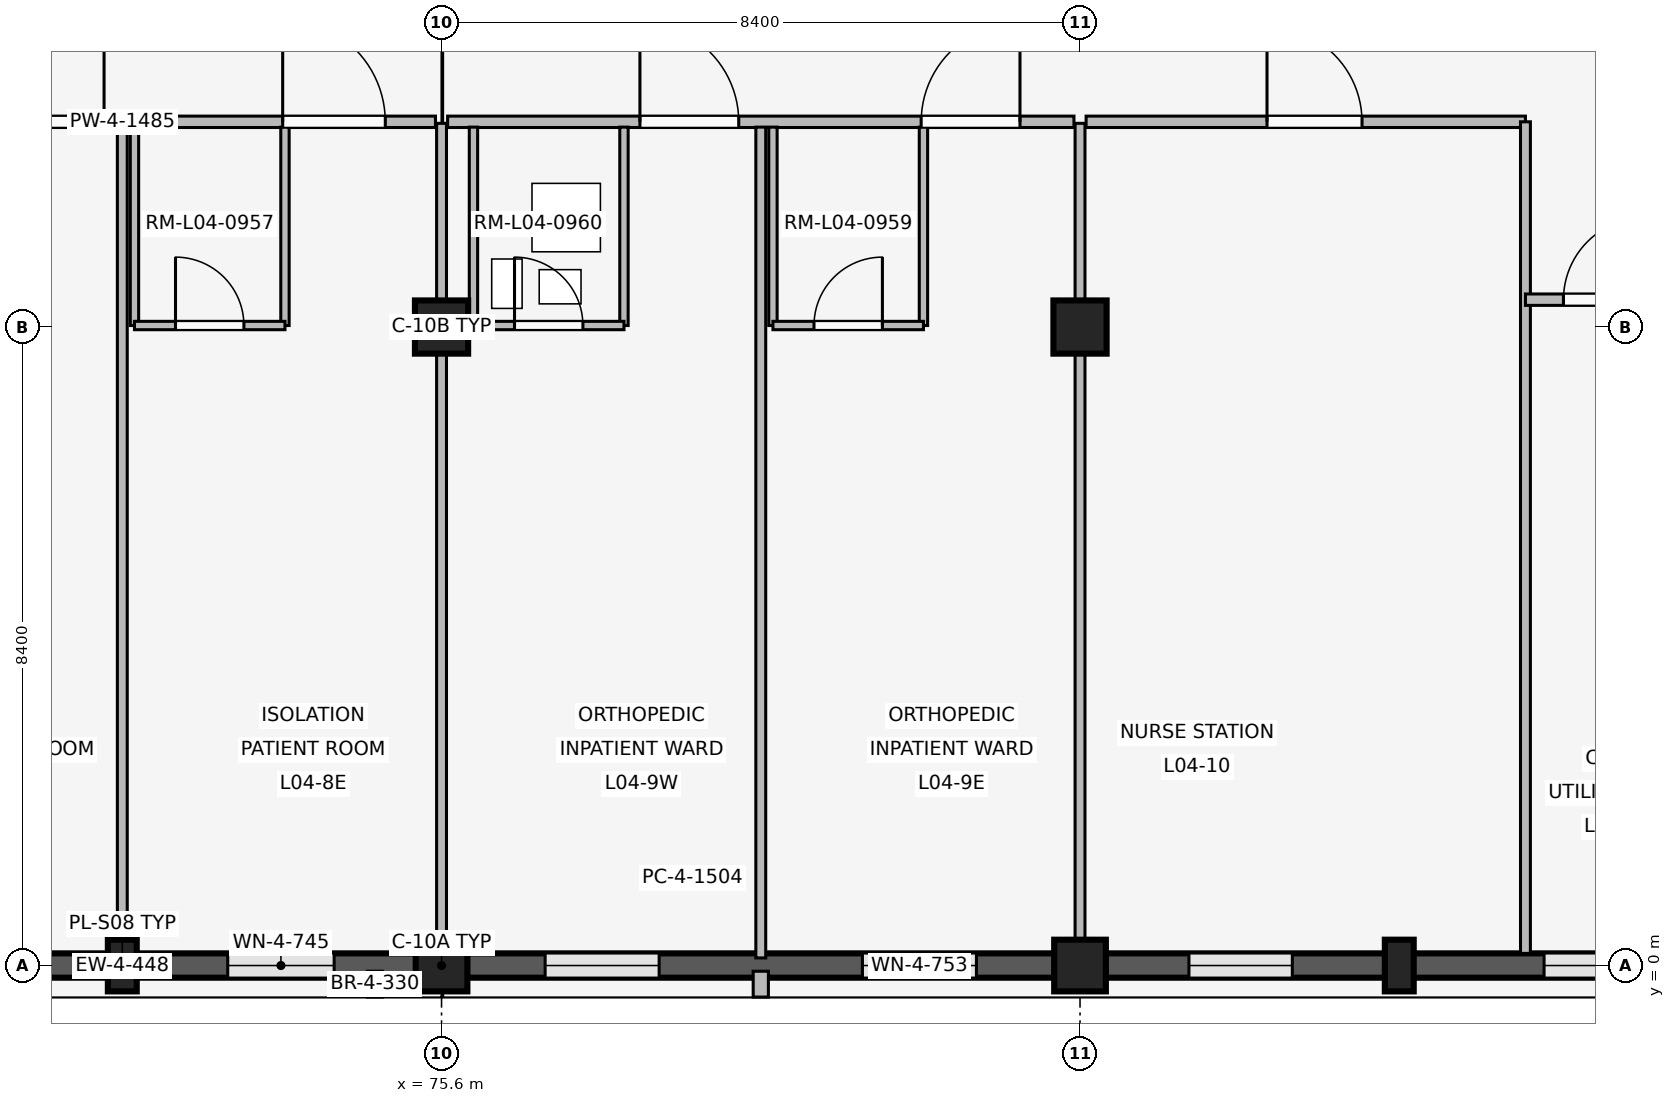
"""IFC4 building model, lengths in metres.
Left out: names, types, materials, properties, quantities, classifications, styles, units other than length and angle.
Written with IfcOpenShell. Run it as: python <this file> out.ifc"""

import sys

from ifc_helpers import new_model, si_unit, direction, frame, frame_2d, origin, origin_2d, place, context, subcontext, project, spatial, rectangle, extrude, element, fill, save


model = new_model("IFC4")
c1 = context("Model", 3, precision=1e-05, world=origin(), true_north=direction((0.0, 1.0)))
c2 = subcontext(c1, "Body", "Model", "MODEL_VIEW")
j1 = project(units=[si_unit("LENGTHUNIT", "METRE"), si_unit("PLANEANGLEUNIT", "RADIAN")], contexts=[c1])
p1 = place(None, origin())
s1 = spatial("IfcSite", under=j1, at=p1, CompositionType="ELEMENT")
p2 = place(p1, origin())
s2 = spatial("IfcBuilding", under=s1, at=p2, CompositionType="ELEMENT")
p3 = place(p2, frame((0.0, 0.0, 16.2)))
s3 = spatial("IfcBuildingStorey", under=s2, at=p3, CompositionType="ELEMENT", Elevation=16.2)
p4 = place(p3, frame((75.6, 0.0, 0.0), z_axis=(0.0, 0.0, 1.0), x_axis=(1.0, 0.0, 0.0)))
e1 = element("IfcColumn", 1, at=p4, inside=s3, PredefinedType="COLUMN", context=c2, shape_type="SweptSolid", body=[
    extrude(rectangle(XDim=0.68, YDim=0.68, at=origin_2d()), origin(), (0.0, 0.0, 1.0), 4.2),
])
p5 = place(p3, frame((75.6, 8.4, 0.0), z_axis=(0.0, 0.0, 1.0), x_axis=(1.0, 0.0, 0.0)))
e2 = element("IfcColumn", 2, at=p5, inside=s3, PredefinedType="COLUMN", context=c2, shape_type="SweptSolid", body=[
    extrude(rectangle(XDim=0.7, YDim=0.7, at=origin_2d()), origin(), (0.0, 0.0, 1.0), 4.2),
])
p6 = place(p3, frame((84.0, 0.0, 0.0), z_axis=(0.0, 0.0, 1.0), x_axis=(1.0, 0.0, 0.0)))
e3 = element("IfcColumn", 3, at=p6, inside=s3, PredefinedType="COLUMN", context=c2, shape_type="SweptSolid", body=[
    extrude(rectangle(XDim=0.68, YDim=0.68, at=origin_2d()), origin(), (0.0, 0.0, 1.0), 4.2),
])
p7 = place(p3, frame((84.0, 8.4, 0.0), z_axis=(0.0, 0.0, 1.0), x_axis=(1.0, 0.0, 0.0)))
e4 = element("IfcColumn", 4, at=p7, inside=s3, PredefinedType="COLUMN", context=c2, shape_type="SweptSolid", body=[
    extrude(rectangle(XDim=0.7, YDim=0.7, at=origin_2d()), origin(), (0.0, 0.0, 1.0), 4.2),
])
for number, where, z_axis, x_axis in (
    (5, (71.4, 0.0, 0.0), (0.0, 0.0, 1.0), (1.0, 0.0, 0.0)),
    (6, (88.2, 0.0, 0.0), (0.0, 0.0, 1.0), (1.0, 0.0, 0.0)),
):
    element("IfcColumn", number, at=place(p3, frame(where, z_axis=z_axis, x_axis=x_axis)), inside=s3, PredefinedType="PILASTER", context=c2, shape_type="SweptSolid", body=[
        extrude(rectangle(XDim=0.38, YDim=0.68, at=origin_2d()), origin(), (0.0, 0.0, 1.0), 4.2),
    ])
p8 = place(p3, frame((75.265, 0.0, 0.0), z_axis=(0.0, 0.0, 1.0), x_axis=(-1.0, 0.0, 0.0)))
e7 = element("IfcWall", 7, at=p8, inside=s3, PredefinedType="SOLIDWALL", context=c2, shape_type="SweptSolid", body=[
    extrude(rectangle(XDim=7.73, YDim=0.32, at=frame_2d((3.865, 0.0))), origin(), (0.0, 0.0, 1.0), 3.32),
])
p9 = place(p8, frame((1.078, 0.0, 0.85)))
e8 = element("IfcOpeningElement", 8, at=p9, cuts=e7, PredefinedType="OPENING", context=c2, shape_type="SweptSolid", body=[
    extrude(rectangle(XDim=1.4, YDim=1.4, at=frame_2d((0.7, 0.7))), frame((0.0, 0.17, 0.0), z_axis=(0.0, -1.0, 0.0), x_axis=(1.0, 0.0, 0.0)), (0.0, 0.0, 1.0), 0.34),
])
p10 = place(p8, frame((5.252, 0.0, 0.85)))
e9 = element("IfcOpeningElement", 9, at=p10, cuts=e7, PredefinedType="OPENING", context=c2, shape_type="SweptSolid", body=[
    extrude(rectangle(XDim=1.4, YDim=1.4, at=frame_2d((0.7, 0.7))), frame((0.0, 0.17, 0.0), z_axis=(0.0, -1.0, 0.0), x_axis=(1.0, 0.0, 0.0)), (0.0, 0.0, 1.0), 0.34),
])
p11 = place(p3, frame((74.724, -0.075, 0.0), z_axis=(0.0, 0.0, 1.0), x_axis=(0.0, -1.0, 0.0)))
e10 = element("IfcWall", 10, at=p11, inside=s3, PredefinedType="ELEMENTEDWALL", context=c2, shape_type="SweptSolid", body=[
    extrude(rectangle(XDim=0.34, YDim=0.2, at=frame_2d((0.17, 0.0))), origin(), (0.0, 0.0, 1.0), 3.3),
])
p12 = place(p3, frame((83.665, 0.0, 0.0), z_axis=(0.0, 0.0, 1.0), x_axis=(-1.0, 0.0, 0.0)))
e11 = element("IfcWall", 11, at=p12, inside=s3, PredefinedType="SOLIDWALL", context=c2, shape_type="SweptSolid", body=[
    extrude(rectangle(XDim=7.73, YDim=0.32, at=frame_2d((3.865, 0.0))), origin(), (0.0, 0.0, 1.0), 3.32),
])
p13 = place(p12, frame((1.028, 0.0, 0.85)))
e12 = element("IfcOpeningElement", 12, at=p13, cuts=e11, PredefinedType="OPENING", context=c2, shape_type="SweptSolid", body=[
    extrude(rectangle(XDim=1.5, YDim=1.55, at=frame_2d((0.75, 0.775))), frame((0.0, 0.17, 0.0), z_axis=(0.0, -1.0, 0.0), x_axis=(1.0, 0.0, 0.0)), (0.0, 0.0, 1.0), 0.34),
])
p14 = place(p12, frame((5.202, 0.0, 0.85)))
e13 = element("IfcOpeningElement", 13, at=p14, cuts=e11, PredefinedType="OPENING", context=c2, shape_type="SweptSolid", body=[
    extrude(rectangle(XDim=1.5, YDim=1.55, at=frame_2d((0.75, 0.775))), frame((0.0, 0.17, 0.0), z_axis=(0.0, -1.0, 0.0), x_axis=(1.0, 0.0, 0.0)), (0.0, 0.0, 1.0), 0.34),
])
p15 = place(p3, frame((79.8, -0.075, 0.0), z_axis=(0.0, 0.0, 1.0), x_axis=(0.0, -1.0, 0.0)))
e14 = element("IfcWall", 14, at=p15, inside=s3, PredefinedType="ELEMENTEDWALL", context=c2, shape_type="SweptSolid", body=[
    extrude(rectangle(XDim=0.34, YDim=0.2, at=frame_2d((0.17, 0.0))), origin(), (0.0, 0.0, 1.0), 3.3),
])
p16 = place(p3, frame((92.065, 0.0, 0.0), z_axis=(0.0, 0.0, 1.0), x_axis=(-1.0, 0.0, 0.0)))
e15 = element("IfcWall", 15, at=p16, inside=s3, PredefinedType="SOLIDWALL", context=c2, shape_type="SweptSolid", body=[
    extrude(rectangle(XDim=7.73, YDim=0.32, at=frame_2d((3.865, 0.0))), origin(), (0.0, 0.0, 1.0), 3.32),
])
p17 = place(p16, frame((0.6, 0.0, 0.85)))
e16 = element("IfcOpeningElement", 16, at=p17, cuts=e15, PredefinedType="OPENING", context=c2, shape_type="SweptSolid", body=[
    extrude(rectangle(XDim=1.36, YDim=1.42, at=frame_2d((0.68, 0.71))), frame((0.0, 0.17, 0.0), z_axis=(0.0, -1.0, 0.0), x_axis=(1.0, 0.0, 0.0)), (0.0, 0.0, 1.0), 0.34),
])
p18 = place(p16, frame((5.272, 0.0, 0.85)))
e17 = element("IfcOpeningElement", 17, at=p18, cuts=e15, PredefinedType="OPENING", context=c2, shape_type="SweptSolid", body=[
    extrude(rectangle(XDim=1.36, YDim=1.42, at=frame_2d((0.68, 0.71))), frame((0.0, 0.17, 0.0), z_axis=(0.0, -1.0, 0.0), x_axis=(1.0, 0.0, 0.0)), (0.0, 0.0, 1.0), 0.34),
])
p19 = place(p3, frame((67.28, 11.1, 0.0), z_axis=(0.0, 0.0, 1.0), x_axis=(1.0, 0.0, 0.0)))
e18 = element("IfcWall", 18, at=p19, inside=s3, PredefinedType="PARTITIONING", context=c2, shape_type="SweptSolid", body=[
    extrude(rectangle(XDim=8.24, YDim=0.15, at=frame_2d((4.12, 0.0))), origin(), (0.0, 0.0, 1.0), 3.3),
])
p20 = place(p19, frame((2.53, 0.0, 0.0)))
e19 = element("IfcOpeningElement", 19, at=p20, cuts=e18, PredefinedType="OPENING", context=c2, shape_type="SweptSolid", body=[
    extrude(rectangle(XDim=1.35, YDim=2.25, at=frame_2d((0.675, 1.125))), frame((0.0, 0.085, 0.0), z_axis=(0.0, -1.0, 0.0), x_axis=(1.0, 0.0, 0.0)), (0.0, 0.0, 1.0), 0.17),
])
p21 = place(p19, frame((6.23, 0.0, 0.0)))
e20 = element("IfcOpeningElement", 20, at=p21, cuts=e18, PredefinedType="OPENING", context=c2, shape_type="SweptSolid", body=[
    extrude(rectangle(XDim=1.35, YDim=2.25, at=frame_2d((0.675, 1.125))), frame((0.0, 0.085, 0.0), z_axis=(0.0, -1.0, 0.0), x_axis=(1.0, 0.0, 0.0)), (0.0, 0.0, 1.0), 0.17),
])
p22 = place(p3, frame((71.4, 0.1, 0.0), z_axis=(0.0, 0.0, 1.0), x_axis=(0.0, 1.0, 0.0)))
e21 = element("IfcWall", 21, at=p22, inside=s3, PredefinedType="PARTITIONING", context=c2, shape_type="SweptSolid", body=[
    extrude(rectangle(XDim=10.93, YDim=0.13, at=frame_2d((5.465, 0.0))), origin(), (0.0, 0.0, 1.0), 3.3),
])
for number, where, z_axis, x_axis in (
    (22, (71.56, 8.42, 0.0), (0.0, 0.0, 1.0), (0.0, 1.0, 0.0)),
    (23, (73.54, 8.42, 0.0), (0.0, 0.0, 1.0), (0.0, 1.0, 0.0)),
):
    element("IfcWall", number, at=place(p3, frame(where, z_axis=z_axis, x_axis=x_axis)), inside=s3, PredefinedType="PARTITIONING", context=c2, shape_type="SweptSolid", body=[
        extrude(rectangle(XDim=2.61, YDim=0.11, at=frame_2d((1.305, 0.0))), origin(), (0.0, 0.0, 1.0), 3.3),
    ])
p23 = place(p3, frame((71.56, 8.42, 0.0), z_axis=(0.0, 0.0, 1.0), x_axis=(1.0, 0.0, 0.0)))
e24 = element("IfcWall", 24, at=p23, inside=s3, PredefinedType="PARTITIONING", context=c2, shape_type="SweptSolid", body=[
    extrude(rectangle(XDim=1.98, YDim=0.11, at=frame_2d((0.99, 0.0))), origin(), (0.0, 0.0, 1.0), 3.3),
])
p24 = place(p23, frame((0.54, 0.0, 0.0)))
e25 = element("IfcOpeningElement", 25, at=p24, cuts=e24, PredefinedType="OPENING", context=c2, shape_type="SweptSolid", body=[
    extrude(rectangle(XDim=0.9, YDim=2.1, at=frame_2d((0.45, 1.05))), frame((0.0, 0.065, 0.0), z_axis=(0.0, -1.0, 0.0), x_axis=(1.0, 0.0, 0.0)), (0.0, 0.0, 1.0), 0.13),
])
p25 = place(p3, frame((75.6, 0.14, 0.0), z_axis=(0.0, 0.0, 1.0), x_axis=(0.0, 1.0, 0.0)))
e26 = element("IfcWall", 26, at=p25, inside=s3, PredefinedType="PARTITIONING", context=c2, shape_type="SweptSolid", body=[
    extrude(rectangle(XDim=10.94, YDim=0.13, at=frame_2d((5.47, 0.0))), origin(), (0.0, 0.0, 1.0), 3.3),
])
p26 = place(p3, frame((75.68, 11.1, 0.0), z_axis=(0.0, 0.0, 1.0), x_axis=(1.0, 0.0, 0.0)))
e27 = element("IfcWall", 27, at=p26, inside=s3, PredefinedType="PARTITIONING", context=c2, shape_type="SweptSolid", body=[
    extrude(rectangle(XDim=8.24, YDim=0.15, at=frame_2d((4.12, 0.0))), origin(), (0.0, 0.0, 1.0), 3.3),
])
p27 = place(p26, frame((2.53, 0.0, 0.0)))
e28 = element("IfcOpeningElement", 28, at=p27, cuts=e27, PredefinedType="OPENING", context=c2, shape_type="SweptSolid", body=[
    extrude(rectangle(XDim=1.3, YDim=2.25, at=frame_2d((0.65, 1.125))), frame((0.0, 0.085, 0.0), z_axis=(0.0, -1.0, 0.0), x_axis=(1.0, 0.0, 0.0)), (0.0, 0.0, 1.0), 0.17),
])
p28 = place(p26, frame((6.23, 0.0, 0.0)))
e29 = element("IfcOpeningElement", 29, at=p28, cuts=e27, PredefinedType="OPENING", context=c2, shape_type="SweptSolid", body=[
    extrude(rectangle(XDim=1.3, YDim=2.25, at=frame_2d((0.65, 1.125))), frame((0.0, 0.085, 0.0), z_axis=(0.0, -1.0, 0.0), x_axis=(1.0, 0.0, 0.0)), (0.0, 0.0, 1.0), 0.17),
])
p29 = place(p3, frame((79.8, 0.1, 0.0), z_axis=(0.0, 0.0, 1.0), x_axis=(0.0, 1.0, 0.0)))
e30 = element("IfcWall", 30, at=p29, inside=s3, PredefinedType="PARTITIONING", context=c2, shape_type="SweptSolid", body=[
    extrude(rectangle(XDim=10.93, YDim=0.13, at=frame_2d((5.465, 0.0))), origin(), (0.0, 0.0, 1.0), 3.3),
])
for number, where, z_axis, x_axis in (
    (31, (76.02, 8.42, 0.0), (0.0, 0.0, 1.0), (0.0, 1.0, 0.0)),
    (32, (78.0, 8.42, 0.0), (0.0, 0.0, 1.0), (0.0, 1.0, 0.0)),
):
    element("IfcWall", number, at=place(p3, frame(where, z_axis=z_axis, x_axis=x_axis)), inside=s3, PredefinedType="PARTITIONING", context=c2, shape_type="SweptSolid", body=[
        extrude(rectangle(XDim=2.61, YDim=0.11, at=frame_2d((1.305, 0.0))), origin(), (0.0, 0.0, 1.0), 3.3),
    ])
p30 = place(p3, frame((76.02, 8.42, 0.0), z_axis=(0.0, 0.0, 1.0), x_axis=(1.0, 0.0, 0.0)))
e33 = element("IfcWall", 33, at=p30, inside=s3, PredefinedType="PARTITIONING", context=c2, shape_type="SweptSolid", body=[
    extrude(rectangle(XDim=1.98, YDim=0.11, at=frame_2d((0.99, 0.0))), origin(), (0.0, 0.0, 1.0), 3.3),
])
p31 = place(p30, frame((0.54, 0.0, 0.0)))
e34 = element("IfcOpeningElement", 34, at=p31, cuts=e33, PredefinedType="OPENING", context=c2, shape_type="SweptSolid", body=[
    extrude(rectangle(XDim=0.9, YDim=2.1, at=frame_2d((0.45, 1.05))), frame((0.0, 0.065, 0.0), z_axis=(0.0, -1.0, 0.0), x_axis=(1.0, 0.0, 0.0)), (0.0, 0.0, 1.0), 0.13),
])
for number, where, z_axis, x_axis in (
    (35, (79.96, 8.42, 0.0), (0.0, 0.0, 1.0), (0.0, 1.0, 0.0)),
    (36, (81.94, 8.42, 0.0), (0.0, 0.0, 1.0), (0.0, 1.0, 0.0)),
):
    element("IfcWall", number, at=place(p3, frame(where, z_axis=z_axis, x_axis=x_axis)), inside=s3, PredefinedType="PARTITIONING", context=c2, shape_type="SweptSolid", body=[
        extrude(rectangle(XDim=2.61, YDim=0.11, at=frame_2d((1.305, 0.0))), origin(), (0.0, 0.0, 1.0), 3.3),
    ])
p32 = place(p3, frame((79.96, 8.42, 0.0), z_axis=(0.0, 0.0, 1.0), x_axis=(1.0, 0.0, 0.0)))
e37 = element("IfcWall", 37, at=p32, inside=s3, PredefinedType="PARTITIONING", context=c2, shape_type="SweptSolid", body=[
    extrude(rectangle(XDim=1.98, YDim=0.11, at=frame_2d((0.99, 0.0))), origin(), (0.0, 0.0, 1.0), 3.3),
])
p33 = place(p32, frame((0.54, 0.0, 0.0)))
e38 = element("IfcOpeningElement", 38, at=p33, cuts=e37, PredefinedType="OPENING", context=c2, shape_type="SweptSolid", body=[
    extrude(rectangle(XDim=0.9, YDim=2.1, at=frame_2d((0.45, 1.05))), frame((0.0, 0.065, 0.0), z_axis=(0.0, -1.0, 0.0), x_axis=(1.0, 0.0, 0.0)), (0.0, 0.0, 1.0), 0.13),
])
p34 = place(p3, frame((78.45, 1.15, 0.0), z_axis=(0.0, 0.0, 1.0), x_axis=(1.0, 0.0, 0.0)))
e39 = element("IfcWall", 39, at=p34, inside=s3, PredefinedType="PLUMBINGWALL", context=c2, shape_type="SweptSolid", body=[
    extrude(rectangle(XDim=0.9, YDim=0.24, at=frame_2d((0.45, 0.0))), origin(), (0.0, 0.0, 1.0), 3.3),
])
p35 = place(p3, frame((84.0, 0.14, 0.0), z_axis=(0.0, 0.0, 1.0), x_axis=(0.0, 1.0, 0.0)))
e40 = element("IfcWall", 40, at=p35, inside=s3, PredefinedType="PARTITIONING", context=c2, shape_type="SweptSolid", body=[
    extrude(rectangle(XDim=10.94, YDim=0.13, at=frame_2d((5.47, 0.0))), origin(), (0.0, 0.0, 1.0), 3.3),
])
p36 = place(p3, frame((84.08, 11.1, 0.0), z_axis=(0.0, 0.0, 1.0), x_axis=(1.0, 0.0, 0.0)))
e41 = element("IfcWall", 41, at=p36, inside=s3, PredefinedType="PARTITIONING", context=c2, shape_type="SweptSolid", body=[
    extrude(rectangle(XDim=5.78, YDim=0.15, at=frame_2d((2.89, 0.0))), origin(), (0.0, 0.0, 1.0), 3.3),
])
p37 = place(p36, frame((2.38, 0.0, 0.0)))
e42 = element("IfcOpeningElement", 42, at=p37, cuts=e41, PredefinedType="OPENING", context=c2, shape_type="SweptSolid", body=[
    extrude(rectangle(XDim=1.25, YDim=2.2, at=frame_2d((0.625, 1.1))), frame((0.0, 0.085, 0.0), z_axis=(0.0, -1.0, 0.0), x_axis=(1.0, 0.0, 0.0)), (0.0, 0.0, 1.0), 0.17),
])
p38 = place(p3, frame((89.86, 0.16, 0.0), z_axis=(0.0, 0.0, 1.0), x_axis=(0.0, 1.0, 0.0)))
e43 = element("IfcWall", 43, at=p38, inside=s3, PredefinedType="PARTITIONING", context=c2, shape_type="SweptSolid", body=[
    extrude(rectangle(XDim=10.94, YDim=0.13, at=frame_2d((5.47, 0.0))), origin(), (0.0, 0.0, 1.0), 3.3),
])
p39 = place(p3, frame((89.86, 8.76, 0.0), z_axis=(0.0, 0.0, 1.0), x_axis=(1.0, 0.0, 0.0)))
e44 = element("IfcWall", 44, at=p39, inside=s3, PredefinedType="PARTITIONING", context=c2, shape_type="SweptSolid", body=[
    extrude(rectangle(XDim=2.18, YDim=0.15, at=frame_2d((1.09, 0.0))), origin(), (0.0, 0.0, 1.0), 3.3),
])
p40 = place(p39, frame((0.5, 0.0, 0.0)))
e45 = element("IfcOpeningElement", 45, at=p40, cuts=e44, PredefinedType="OPENING", context=c2, shape_type="SweptSolid", body=[
    extrude(rectangle(XDim=1.08, YDim=2.15, at=frame_2d((0.54, 1.075))), frame((0.0, 0.085, 0.0), z_axis=(0.0, -1.0, 0.0), x_axis=(1.0, 0.0, 0.0)), (0.0, 0.0, 1.0), 0.17),
])
p41 = place(p9, origin())
e46 = element("IfcWindow", 46, at=p41, inside=s3, PartitioningType="SINGLE_PANEL", PredefinedType="WINDOW", context=c2, shape_type="SweptSolid", body=[
    extrude(rectangle(XDim=1.4, YDim=1.4, at=frame_2d((0.7, 0.7))), frame((0.0, 0.03, 0.0), z_axis=(0.0, -1.0, 0.0), x_axis=(1.0, 0.0, 0.0)), (0.0, 0.0, 1.0), 0.06),
])
fill(e8, e46)
p42 = place(p13, origin())
e47 = element("IfcWindow", 47, at=p42, inside=s3, PartitioningType="SINGLE_PANEL", PredefinedType="WINDOW", context=c2, shape_type="SweptSolid", body=[
    extrude(rectangle(XDim=1.5, YDim=1.55, at=frame_2d((0.75, 0.775))), frame((0.0, 0.03, 0.0), z_axis=(0.0, -1.0, 0.0), x_axis=(1.0, 0.0, 0.0)), (0.0, 0.0, 1.0), 0.06),
])
fill(e12, e47)
p43 = place(p14, origin())
e48 = element("IfcWindow", 48, at=p43, inside=s3, PartitioningType="SINGLE_PANEL", PredefinedType="WINDOW", context=c2, shape_type="SweptSolid", body=[
    extrude(rectangle(XDim=1.5, YDim=1.55, at=frame_2d((0.75, 0.775))), frame((0.0, 0.03, 0.0), z_axis=(0.0, -1.0, 0.0), x_axis=(1.0, 0.0, 0.0)), (0.0, 0.0, 1.0), 0.06),
])
fill(e13, e48)
p44 = place(p17, origin())
e49 = element("IfcWindow", 49, at=p44, inside=s3, PartitioningType="SINGLE_PANEL", PredefinedType="WINDOW", context=c2, shape_type="SweptSolid", body=[
    extrude(rectangle(XDim=1.36, YDim=1.42, at=frame_2d((0.68, 0.71))), frame((0.0, 0.03, 0.0), z_axis=(0.0, -1.0, 0.0), x_axis=(1.0, 0.0, 0.0)), (0.0, 0.0, 1.0), 0.06),
])
fill(e16, e49)
p45 = place(p18, origin())
e50 = element("IfcWindow", 50, at=p45, inside=s3, PartitioningType="SINGLE_PANEL", PredefinedType="WINDOW", context=c2, shape_type="SweptSolid", body=[
    extrude(rectangle(XDim=1.36, YDim=1.42, at=frame_2d((0.68, 0.71))), frame((0.0, 0.03, 0.0), z_axis=(0.0, -1.0, 0.0), x_axis=(1.0, 0.0, 0.0)), (0.0, 0.0, 1.0), 0.06),
])
fill(e17, e50)
p46 = place(p20, origin())
e51 = element("IfcDoor", 51, at=p46, inside=s3, OperationType="SINGLE_SWING_RIGHT", PredefinedType="DOOR", context=c2, shape_type="SweptSolid", body=[
    extrude(rectangle(XDim=1.35, YDim=2.25, at=frame_2d((0.675, 1.125))), frame((0.0, 0.025, 0.0), z_axis=(0.0, -1.0, 0.0), x_axis=(1.0, 0.0, 0.0)), (0.0, 0.0, 1.0), 0.05),
])
fill(e19, e51)
p47 = place(p21, origin())
e52 = element("IfcDoor", 52, at=p47, inside=s3, OperationType="SINGLE_SWING_LEFT", PredefinedType="DOOR", context=c2, shape_type="SweptSolid", body=[
    extrude(rectangle(XDim=1.35, YDim=2.25, at=frame_2d((0.675, 1.125))), frame((0.0, 0.025, 0.0), z_axis=(0.0, -1.0, 0.0), x_axis=(1.0, 0.0, 0.0)), (0.0, 0.0, 1.0), 0.05),
])
fill(e20, e52)
p48 = place(p24, origin())
e53 = element("IfcDoor", 53, at=p48, inside=s3, OperationType="SINGLE_SWING_LEFT", PredefinedType="DOOR", context=c2, shape_type="SweptSolid", body=[
    extrude(rectangle(XDim=0.9, YDim=2.1, at=frame_2d((0.45, 1.05))), frame((0.0, 0.025, 0.0), z_axis=(0.0, -1.0, 0.0), x_axis=(1.0, 0.0, 0.0)), (0.0, 0.0, 1.0), 0.05),
])
fill(e25, e53)
p49 = place(p27, origin())
e54 = element("IfcDoor", 54, at=p49, inside=s3, OperationType="SINGLE_SWING_LEFT", PredefinedType="DOOR", context=c2, shape_type="SweptSolid", body=[
    extrude(rectangle(XDim=1.3, YDim=2.25, at=frame_2d((0.65, 1.125))), frame((0.0, 0.025, 0.0), z_axis=(0.0, -1.0, 0.0), x_axis=(1.0, 0.0, 0.0)), (0.0, 0.0, 1.0), 0.05),
])
fill(e28, e54)
p50 = place(p28, origin())
e55 = element("IfcDoor", 55, at=p50, inside=s3, OperationType="SINGLE_SWING_RIGHT", PredefinedType="DOOR", context=c2, shape_type="SweptSolid", body=[
    extrude(rectangle(XDim=1.3, YDim=2.25, at=frame_2d((0.65, 1.125))), frame((0.0, 0.025, 0.0), z_axis=(0.0, -1.0, 0.0), x_axis=(1.0, 0.0, 0.0)), (0.0, 0.0, 1.0), 0.05),
])
fill(e29, e55)
p51 = place(p31, origin())
e56 = element("IfcDoor", 56, at=p51, inside=s3, OperationType="SINGLE_SWING_LEFT", PredefinedType="DOOR", context=c2, shape_type="SweptSolid", body=[
    extrude(rectangle(XDim=0.9, YDim=2.1, at=frame_2d((0.45, 1.05))), frame((0.0, 0.025, 0.0), z_axis=(0.0, -1.0, 0.0), x_axis=(1.0, 0.0, 0.0)), (0.0, 0.0, 1.0), 0.05),
])
fill(e34, e56)
p52 = place(p33, origin())
e57 = element("IfcDoor", 57, at=p52, inside=s3, OperationType="SINGLE_SWING_RIGHT", PredefinedType="DOOR", context=c2, shape_type="SweptSolid", body=[
    extrude(rectangle(XDim=0.9, YDim=2.1, at=frame_2d((0.45, 1.05))), frame((0.0, 0.025, 0.0), z_axis=(0.0, -1.0, 0.0), x_axis=(1.0, 0.0, 0.0)), (0.0, 0.0, 1.0), 0.05),
])
fill(e38, e57)
p53 = place(p37, origin())
e58 = element("IfcDoor", 58, at=p53, inside=s3, OperationType="SINGLE_SWING_LEFT", PredefinedType="DOOR", context=c2, shape_type="SweptSolid", body=[
    extrude(rectangle(XDim=1.25, YDim=2.2, at=frame_2d((0.625, 1.1))), frame((0.0, 0.025, 0.0), z_axis=(0.0, -1.0, 0.0), x_axis=(1.0, 0.0, 0.0)), (0.0, 0.0, 1.0), 0.05),
])
fill(e42, e58)
p54 = place(p40, origin())
e59 = element("IfcDoor", 59, at=p54, inside=s3, OperationType="SINGLE_SWING_RIGHT", PredefinedType="DOOR", context=c2, shape_type="SweptSolid", body=[
    extrude(rectangle(XDim=1.08, YDim=2.15, at=frame_2d((0.54, 1.075))), frame((0.0, 0.025, 0.0), z_axis=(0.0, -1.0, 0.0), x_axis=(1.0, 0.0, 0.0)), (0.0, 0.0, 1.0), 0.05),
])
fill(e45, e59)
save(model, sys.argv[1])
